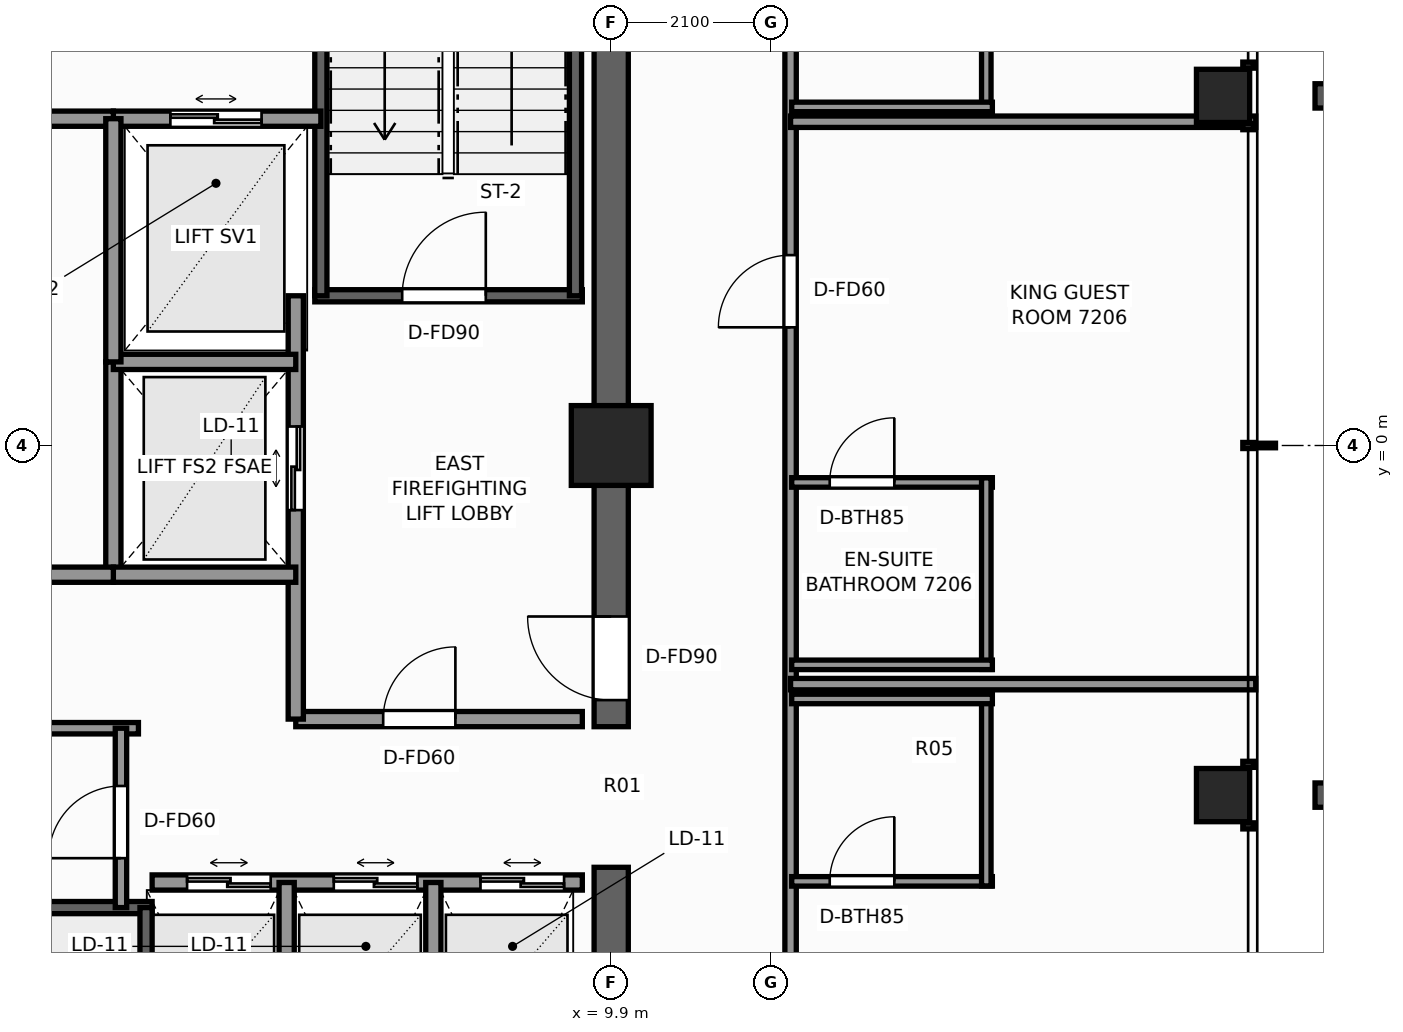
"""IFC4 building model, lengths in metres.
Left out: names, types, materials, properties, quantities, classifications, styles, units other than length and angle.
Written with IfcOpenShell. Run it as: python <this file> out.ifc"""

import sys

from ifc_helpers import new_model, si_unit, direction, frame, frame_2d, origin, origin_2d, place, context, subcontext, project, spatial, rectangle, extrude, element, fill, save


model = new_model("IFC4")
c1 = context("Model", 3, precision=1e-05, world=origin(), true_north=direction((0.0, 1.0)))
c2 = subcontext(c1, "Body", "Model", "MODEL_VIEW")
j1 = project(units=[si_unit("LENGTHUNIT", "METRE"), si_unit("PLANEANGLEUNIT", "RADIAN")], contexts=[c1])
p1 = place(None, origin())
s1 = spatial("IfcSite", under=j1, at=p1, CompositionType="ELEMENT")
p2 = place(p1, origin())
s2 = spatial("IfcBuilding", under=s1, at=p2, CompositionType="ELEMENT")
p3 = place(p2, frame((0.0, 0.0, 247.9)))
s3 = spatial("IfcBuildingStorey", under=s2, at=p3, CompositionType="ELEMENT", Elevation=247.9)
p4 = place(p3, frame((9.9, -9.675, 0.0), z_axis=(0.0, 0.0, 1.0), x_axis=(0.0, 1.0, 0.0)))
e1 = element("IfcWall", 1, at=p4, inside=s3, PredefinedType="SHEAR", context=c2, shape_type="SweptSolid", body=[
    extrude(rectangle(XDim=4.125, YDim=0.45, at=frame_2d((2.062, 0.0))), origin(), (0.0, 0.0, 1.0), 3.5),
])
p5 = place(p3, frame((9.9, -3.7, 0.0), z_axis=(0.0, 0.0, 1.0), x_axis=(0.0, 1.0, 0.0)))
e2 = element("IfcWall", 2, at=p5, inside=s3, PredefinedType="SHEAR", context=c2, shape_type="SweptSolid", body=[
    extrude(rectangle(XDim=13.375, YDim=0.45, at=frame_2d((6.688, 0.0))), origin(), (0.0, 0.0, 1.0), 3.5),
])
p6 = place(p5, frame((0.35, 0.0, 0.0)))
e3 = element("IfcOpeningElement", 3, at=p6, cuts=e2, PredefinedType="OPENING", context=c2, shape_type="SweptSolid", body=[
    extrude(rectangle(XDim=1.1, YDim=2.2, at=frame_2d((0.55, 1.1))), frame((0.0, 0.235, 0.0), z_axis=(0.0, -1.0, 0.0), x_axis=(1.0, 0.0, 0.0)), (0.0, 0.0, 1.0), 0.47),
])
p7 = place(p3, frame((9.9, 0.0, 0.0), z_axis=(0.0, 0.0, 1.0), x_axis=(1.0, 0.0, 0.0)))
e4 = element("IfcColumn", 4, at=p7, inside=s3, PredefinedType="COLUMN", context=c2, shape_type="SweptSolid", body=[
    extrude(rectangle(XDim=1.05, YDim=1.05, at=origin_2d()), origin(), (0.0, 0.0, 1.0), 3.5),
])
for number, where, z_axis, x_axis in (
    (5, (17.95, -4.6, 0.0), (0.0, 0.0, 1.0), (1.0, 0.0, 0.0)),
    (6, (17.95, 4.6, 0.0), (0.0, 0.0, 1.0), (1.0, 0.0, 0.0)),
):
    element("IfcColumn", number, at=place(p3, frame(where, z_axis=z_axis, x_axis=x_axis)), inside=s3, PredefinedType="COLUMN", context=c2, shape_type="SweptSolid", body=[
        extrude(rectangle(XDim=0.7, YDim=0.7, at=origin_2d()), origin(), (0.0, 0.0, 1.0), 3.5),
    ])
p8 = place(p3, frame((6.0, 1.97, 0.0), z_axis=(0.0, 0.0, 1.0), x_axis=(1.0, 0.0, 0.0)))
e7 = element("IfcWall", 7, at=p8, inside=s3, PredefinedType="SHEAR", context=c2, shape_type="SweptSolid", body=[
    extrude(rectangle(XDim=3.52, YDim=0.16, at=frame_2d((1.76, 0.0))), origin(), (0.0, 0.0, 1.0), 3.5),
])
p9 = place(p8, frame((1.15, 0.0, 0.0)))
e8 = element("IfcOpeningElement", 8, at=p9, cuts=e7, PredefinedType="OPENING", context=c2, shape_type="SweptSolid", body=[
    extrude(rectangle(XDim=1.1, YDim=2.2, at=frame_2d((0.55, 1.1))), frame((0.0, 0.09, 0.0), z_axis=(0.0, -1.0, 0.0), x_axis=(1.0, 0.0, 0.0)), (0.0, 0.0, 1.0), 0.18),
])
for number, where, z_axis, x_axis in (
    (9, (6.08, 1.97, 0.0), (0.0, 0.0, 1.0), (0.0, 1.0, 0.0)),
    (10, (9.43, 1.97, 0.0), (0.0, 0.0, 1.0), (0.0, 1.0, 0.0)),
):
    element("IfcWall", number, at=place(p3, frame(where, z_axis=z_axis, x_axis=x_axis)), inside=s3, PredefinedType="SHEAR", context=c2, shape_type="SweptSolid", body=[
        extrude(rectangle(XDim=7.56, YDim=0.16, at=frame_2d((3.78, 0.0))), origin(), (0.0, 0.0, 1.0), 3.5),
    ])
p10 = place(p3, frame((-3.86, -6.08, 0.0), z_axis=(0.0, 0.0, 1.0), x_axis=(1.0, 0.0, 0.0)))
e11 = element("IfcWall", 11, at=p10, inside=s3, PredefinedType="SHEAR", context=c2, shape_type="SweptSolid", body=[
    extrude(rectangle(XDim=7.72, YDim=0.16, at=frame_2d((3.86, 0.0))), origin(), (0.0, 0.0, 1.0), 3.5),
])
p11 = place(p3, frame((3.78, -9.43, 0.0), z_axis=(0.0, 0.0, 1.0), x_axis=(0.0, 1.0, 0.0)))
e12 = element("IfcWall", 12, at=p11, inside=s3, PredefinedType="SHEAR", context=c2, shape_type="SweptSolid", body=[
    extrude(rectangle(XDim=3.35, YDim=0.16, at=frame_2d((1.675, 0.0))), origin(), (0.0, 0.0, 1.0), 3.5),
])
p12 = place(p3, frame((5.75, -3.6, 0.0), z_axis=(0.0, 0.0, 1.0), x_axis=(1.0, 0.0, 0.0)))
e13 = element("IfcWall", 13, at=p12, inside=s3, PredefinedType="SOLIDWALL", context=c2, shape_type="SweptSolid", body=[
    extrude(rectangle(XDim=3.77, YDim=0.2, at=frame_2d((1.885, 0.0))), origin(), (0.0, 0.0, 1.0), 3.25),
])
p13 = place(p12, frame((1.15, 0.0, 0.0)))
e14 = element("IfcOpeningElement", 14, at=p13, cuts=e13, PredefinedType="OPENING", context=c2, shape_type="SweptSolid", body=[
    extrude(rectangle(XDim=0.95, YDim=2.06, at=frame_2d((0.475, 1.03))), frame((0.0, 0.11, 0.0), z_axis=(0.0, -1.0, 0.0), x_axis=(1.0, 0.0, 0.0)), (0.0, 0.0, 1.0), 0.22),
])
p14 = place(p3, frame((5.75, -3.6, 0.0), z_axis=(0.0, 0.0, 1.0), x_axis=(0.0, 1.0, 0.0)))
e15 = element("IfcWall", 15, at=p14, inside=s3, PredefinedType="SOLIDWALL", context=c2, shape_type="SweptSolid", body=[
    extrude(rectangle(XDim=5.57, YDim=0.2, at=frame_2d((2.785, 0.0))), origin(), (0.0, 0.0, 1.0), 3.25),
])
p15 = place(p14, frame((2.75, 0.0, 0.0)))
e16 = element("IfcOpeningElement", 16, at=p15, cuts=e15, PredefinedType="OPENING", context=c2, shape_type="SweptSolid", body=[
    extrude(rectangle(XDim=1.1, YDim=2.2, at=frame_2d((0.55, 1.1))), frame((0.0, 0.11, 0.0), z_axis=(0.0, -1.0, 0.0), x_axis=(1.0, 0.0, 0.0)), (0.0, 0.0, 1.0), 0.22),
])
p16 = place(p3, frame((3.35, -1.7, 0.0), z_axis=(0.0, 0.0, 1.0), x_axis=(0.0, 1.0, 0.0)))
e17 = element("IfcWall", 17, at=p16, inside=s3, PredefinedType="SOLIDWALL", context=c2, shape_type="SweptSolid", body=[
    extrude(rectangle(XDim=2.8, YDim=0.2, at=frame_2d((1.4, 0.0))), origin(), (0.0, 0.0, 1.0), 3.25),
])
for number, where, z_axis, x_axis in (
    (18, (3.35, -1.7, 0.0), (0.0, 0.0, 1.0), (1.0, 0.0, 0.0)),
    (19, (3.35, 1.1, 0.0), (0.0, 0.0, 1.0), (1.0, 0.0, 0.0)),
):
    element("IfcWall", number, at=place(p3, frame(where, z_axis=z_axis, x_axis=x_axis)), inside=s3, PredefinedType="SOLIDWALL", context=c2, shape_type="SweptSolid", body=[
        extrude(rectangle(XDim=2.4, YDim=0.2, at=frame_2d((1.2, 0.0))), origin(), (0.0, 0.0, 1.0), 3.25),
    ])
p17 = place(p3, frame((3.35, 4.3, 0.0), z_axis=(0.0, 0.0, 1.0), x_axis=(1.0, 0.0, 0.0)))
e20 = element("IfcWall", 20, at=p17, inside=s3, PredefinedType="SOLIDWALL", context=c2, shape_type="SweptSolid", body=[
    extrude(rectangle(XDim=2.73, YDim=0.2, at=frame_2d((1.365, 0.0))), origin(), (0.0, 0.0, 1.0), 3.25),
])
p18 = place(p17, frame((0.75, 0.0, 0.0)))
e21 = element("IfcOpeningElement", 21, at=p18, cuts=e20, PredefinedType="OPENING", context=c2, shape_type="SweptSolid", body=[
    extrude(rectangle(XDim=1.2, YDim=2.25, at=frame_2d((0.6, 1.125))), frame((0.0, 0.11, 0.0), z_axis=(0.0, -1.0, 0.0), x_axis=(1.0, 0.0, 0.0)), (0.0, 0.0, 1.0), 0.22),
])
p19 = place(p3, frame((3.86, -5.75, 0.0), z_axis=(0.0, 0.0, 1.0), x_axis=(1.0, 0.0, 0.0)))
e22 = element("IfcWall", 22, at=p19, inside=s3, PredefinedType="SOLIDWALL", context=c2, shape_type="SweptSolid", body=[
    extrude(rectangle(XDim=5.66, YDim=0.2, at=frame_2d((2.83, 0.0))), origin(), (0.0, 0.0, 1.0), 3.25),
])
p20 = place(p19, frame((0.46, 0.0, 0.0)))
e23 = element("IfcOpeningElement", 23, at=p20, cuts=e22, PredefinedType="OPENING", context=c2, shape_type="SweptSolid", body=[
    extrude(rectangle(XDim=1.1, YDim=2.2, at=frame_2d((0.55, 1.1))), frame((0.0, 0.11, 0.0), z_axis=(0.0, -1.0, 0.0), x_axis=(1.0, 0.0, 0.0)), (0.0, 0.0, 1.0), 0.22),
])
p21 = place(p19, frame((2.39, 0.0, 0.0)))
e24 = element("IfcOpeningElement", 24, at=p21, cuts=e22, PredefinedType="OPENING", context=c2, shape_type="SweptSolid", body=[
    extrude(rectangle(XDim=1.1, YDim=2.2, at=frame_2d((0.55, 1.1))), frame((0.0, 0.11, 0.0), z_axis=(0.0, -1.0, 0.0), x_axis=(1.0, 0.0, 0.0)), (0.0, 0.0, 1.0), 0.22),
])
p22 = place(p19, frame((4.32, 0.0, 0.0)))
e25 = element("IfcOpeningElement", 25, at=p22, cuts=e22, PredefinedType="OPENING", context=c2, shape_type="SweptSolid", body=[
    extrude(rectangle(XDim=1.1, YDim=2.2, at=frame_2d((0.55, 1.1))), frame((0.0, 0.11, 0.0), z_axis=(0.0, -1.0, 0.0), x_axis=(1.0, 0.0, 0.0)), (0.0, 0.0, 1.0), 0.22),
])
for number, where, z_axis, x_axis in (
    (26, (5.63, -9.52, 0.0), (0.0, 0.0, 1.0), (0.0, 1.0, 0.0)),
    (27, (7.56, -9.52, 0.0), (0.0, 0.0, 1.0), (0.0, 1.0, 0.0)),
):
    element("IfcWall", number, at=place(p3, frame(where, z_axis=z_axis, x_axis=x_axis)), inside=s3, PredefinedType="SOLIDWALL", context=c2, shape_type="SweptSolid", body=[
        extrude(rectangle(XDim=3.77, YDim=0.2, at=frame_2d((1.885, 0.0))), origin(), (0.0, 0.0, 1.0), 3.25),
    ])
p23 = place(p3, frame((0.22, 4.3, 0.0), z_axis=(0.0, 0.0, 1.0), x_axis=(1.0, 0.0, 0.0)))
e28 = element("IfcWall", 28, at=p23, inside=s3, PredefinedType="SOLIDWALL", context=c2, shape_type="SweptSolid", body=[
    extrude(rectangle(XDim=3.13, YDim=0.2, at=frame_2d((1.565, 0.0))), origin(), (0.0, 0.0, 1.0), 3.25),
])
p24 = place(p23, frame((1.05, 0.0, 0.0)))
e29 = element("IfcOpeningElement", 29, at=p24, cuts=e28, PredefinedType="OPENING", context=c2, shape_type="SweptSolid", body=[
    extrude(rectangle(XDim=0.95, YDim=2.06, at=frame_2d((0.475, 1.03))), frame((0.0, 0.11, 0.0), z_axis=(0.0, -1.0, 0.0), x_axis=(1.0, 0.0, 0.0)), (0.0, 0.0, 1.0), 0.22),
])
p25 = place(p3, frame((-3.35, -1.7, 0.0), z_axis=(0.0, 0.0, 1.0), x_axis=(1.0, 0.0, 0.0)))
e30 = element("IfcWall", 30, at=p25, inside=s3, PredefinedType="SOLIDWALL", context=c2, shape_type="SweptSolid", body=[
    extrude(rectangle(XDim=6.7, YDim=0.2, at=frame_2d((3.35, 0.0))), origin(), (0.0, 0.0, 1.0), 3.25),
])
p26 = place(p3, frame((3.35, 1.1, 0.0), z_axis=(0.0, 0.0, 1.0), x_axis=(0.0, 1.0, 0.0)))
e31 = element("IfcWall", 31, at=p26, inside=s3, PredefinedType="SOLIDWALL", context=c2, shape_type="SweptSolid", body=[
    extrude(rectangle(XDim=3.2, YDim=0.2, at=frame_2d((1.6, 0.0))), origin(), (0.0, 0.0, 1.0), 3.25),
])
p27 = place(p3, frame((-3.68, -3.72, 0.0), z_axis=(0.0, 0.0, 1.0), x_axis=(1.0, 0.0, 0.0)))
e32 = element("IfcWall", 32, at=p27, inside=s3, PredefinedType="PARTITIONING", context=c2, shape_type="SweptSolid", body=[
    extrude(rectangle(XDim=7.36, YDim=0.15, at=frame_2d((3.68, 0.0))), origin(), (0.0, 0.0, 1.0), 3.25),
])
p28 = place(p3, frame((3.45, -6.08, 0.0), z_axis=(0.0, 0.0, 1.0), x_axis=(0.0, 1.0, 0.0)))
e33 = element("IfcWall", 33, at=p28, inside=s3, PredefinedType="PARTITIONING", context=c2, shape_type="SweptSolid", body=[
    extrude(rectangle(XDim=2.36, YDim=0.15, at=frame_2d((1.18, 0.0))), origin(), (0.0, 0.0, 1.0), 3.25),
])
p29 = place(p28, frame((0.65, 0.0, 0.0)))
e34 = element("IfcOpeningElement", 34, at=p29, cuts=e33, PredefinedType="OPENING", context=c2, shape_type="SweptSolid", body=[
    extrude(rectangle(XDim=0.95, YDim=2.06, at=frame_2d((0.475, 1.03))), frame((0.0, 0.085, 0.0), z_axis=(0.0, -1.0, 0.0), x_axis=(1.0, 0.0, 0.0)), (0.0, 0.0, 1.0), 0.17),
])
p30 = place(p3, frame((12.26, -12.58, 0.0), z_axis=(0.0, 0.0, 1.0), x_axis=(0.0, 1.0, 0.0)))
e35 = element("IfcWall", 35, at=p30, inside=s3, PredefinedType="PARTITIONING", context=c2, shape_type="SweptSolid", body=[
    extrude(rectangle(XDim=24.84, YDim=0.15, at=frame_2d((12.42, 0.0))), origin(), (0.0, 0.0, 1.0), 2.539),
])
p31 = place(p30, frame((4.228, 0.0, 0.0)))
e36 = element("IfcOpeningElement", 36, at=p31, cuts=e35, PredefinedType="OPENING", context=c2, shape_type="SweptSolid", body=[
    extrude(rectangle(XDim=0.95, YDim=2.06, at=frame_2d((0.475, 1.03))), frame((0.0, 0.085, 0.0), z_axis=(0.0, -1.0, 0.0), x_axis=(1.0, 0.0, 0.0)), (0.0, 0.0, 1.0), 0.17),
])
p32 = place(p30, frame((14.135, 0.0, 0.0)))
e37 = element("IfcOpeningElement", 37, at=p32, cuts=e35, PredefinedType="OPENING", context=c2, shape_type="SweptSolid", body=[
    extrude(rectangle(XDim=0.95, YDim=2.06, at=frame_2d((0.475, 1.03))), frame((0.0, 0.085, 0.0), z_axis=(0.0, -1.0, 0.0), x_axis=(1.0, 0.0, 0.0)), (0.0, 0.0, 1.0), 0.17),
])
p33 = place(p30, frame((20.542, 0.0, 0.0)))
e38 = element("IfcOpeningElement", 38, at=p33, cuts=e35, PredefinedType="OPENING", context=c2, shape_type="SweptSolid", body=[
    extrude(rectangle(XDim=0.95, YDim=2.06, at=frame_2d((0.475, 1.03))), frame((0.0, 0.085, 0.0), z_axis=(0.0, -1.0, 0.0), x_axis=(1.0, 0.0, 0.0)), (0.0, 0.0, 1.0), 0.17),
])
p34 = place(p3, frame((12.26, -3.14, 0.0), z_axis=(0.0, 0.0, 1.0), x_axis=(1.0, 0.0, 0.0)))
e39 = element("IfcWall", 39, at=p34, inside=s3, PredefinedType="PARTITIONING", context=c2, shape_type="SweptSolid", body=[
    extrude(rectangle(XDim=6.12, YDim=0.15, at=frame_2d((3.06, 0.0))), origin(), (0.0, 0.0, 1.0), 2.539),
])
p35 = place(p3, frame((12.275, -5.735, 0.0), z_axis=(0.0, 0.0, 1.0), x_axis=(1.0, 0.0, 0.0)))
e40 = element("IfcWall", 40, at=p35, inside=s3, PredefinedType="PARTITIONING", context=c2, shape_type="SweptSolid", body=[
    extrude(rectangle(XDim=2.64, YDim=0.125, at=frame_2d((1.32, 0.0))), origin(), (0.0, 0.0, 1.0), 3.25),
])
p36 = place(p35, frame((0.5, 0.0, 0.0)))
e41 = element("IfcOpeningElement", 41, at=p36, cuts=e40, PredefinedType="OPENING", context=c2, shape_type="SweptSolid", body=[
    extrude(rectangle(XDim=0.85, YDim=2.03, at=frame_2d((0.425, 1.015))), frame((0.0, 0.073, 0.0), z_axis=(0.0, -1.0, 0.0), x_axis=(1.0, 0.0, 0.0)), (0.0, 0.0, 1.0), 0.145),
])
p37 = place(p3, frame((14.835, -5.795, 0.0), z_axis=(0.0, 0.0, 1.0), x_axis=(0.0, 1.0, 0.0)))
e42 = element("IfcWall", 42, at=p37, inside=s3, PredefinedType="PARTITIONING", context=c2, shape_type="SweptSolid", body=[
    extrude(rectangle(XDim=2.52, YDim=0.125, at=frame_2d((1.26, 0.0))), origin(), (0.0, 0.0, 1.0), 2.539),
])
p38 = place(p3, frame((12.275, -3.335, 0.0), z_axis=(0.0, 0.0, 1.0), x_axis=(1.0, 0.0, 0.0)))
e43 = element("IfcWall", 43, at=p38, inside=s3, PredefinedType="PARTITIONING", context=c2, shape_type="SweptSolid", body=[
    extrude(rectangle(XDim=2.64, YDim=0.125, at=frame_2d((1.32, 0.0))), origin(), (0.0, 0.0, 1.0), 2.539),
])
p39 = place(p3, frame((12.26, 4.26, 0.0), z_axis=(0.0, 0.0, 1.0), x_axis=(1.0, 0.0, 0.0)))
e44 = element("IfcWall", 44, at=p39, inside=s3, PredefinedType="PARTITIONING", context=c2, shape_type="SweptSolid", body=[
    extrude(rectangle(XDim=6.12, YDim=0.15, at=frame_2d((3.06, 0.0))), origin(), (0.0, 0.0, 1.0), 2.623),
])
p40 = place(p3, frame((12.275, -0.486, 0.0), z_axis=(0.0, 0.0, 1.0), x_axis=(1.0, 0.0, 0.0)))
e45 = element("IfcWall", 45, at=p40, inside=s3, PredefinedType="PARTITIONING", context=c2, shape_type="SweptSolid", body=[
    extrude(rectangle(XDim=2.64, YDim=0.125, at=frame_2d((1.32, 0.0))), origin(), (0.0, 0.0, 1.0), 3.25),
])
p41 = place(p40, frame((0.5, 0.0, 0.0)))
e46 = element("IfcOpeningElement", 46, at=p41, cuts=e45, PredefinedType="OPENING", context=c2, shape_type="SweptSolid", body=[
    extrude(rectangle(XDim=0.85, YDim=2.03, at=frame_2d((0.425, 1.015))), frame((0.0, 0.073, 0.0), z_axis=(0.0, -1.0, 0.0), x_axis=(1.0, 0.0, 0.0)), (0.0, 0.0, 1.0), 0.145),
])
p42 = place(p3, frame((14.835, -2.946, 0.0), z_axis=(0.0, 0.0, 1.0), x_axis=(0.0, 1.0, 0.0)))
e47 = element("IfcWall", 47, at=p42, inside=s3, PredefinedType="PARTITIONING", context=c2, shape_type="SweptSolid", body=[
    extrude(rectangle(XDim=2.52, YDim=0.125, at=frame_2d((1.26, 0.0))), origin(), (0.0, 0.0, 1.0), 2.539),
])
p43 = place(p3, frame((12.275, -2.886, 0.0), z_axis=(0.0, 0.0, 1.0), x_axis=(1.0, 0.0, 0.0)))
e48 = element("IfcWall", 48, at=p43, inside=s3, PredefinedType="PARTITIONING", context=c2, shape_type="SweptSolid", body=[
    extrude(rectangle(XDim=2.64, YDim=0.125, at=frame_2d((1.32, 0.0))), origin(), (0.0, 0.0, 1.0), 2.539),
])
p44 = place(p3, frame((14.835, 4.395, 0.0), z_axis=(0.0, 0.0, 1.0), x_axis=(0.0, 1.0, 0.0)))
e49 = element("IfcWall", 49, at=p44, inside=s3, PredefinedType="PARTITIONING", context=c2, shape_type="SweptSolid", body=[
    extrude(rectangle(XDim=2.52, YDim=0.125, at=frame_2d((1.26, 0.0))), origin(), (0.0, 0.0, 1.0), 2.539),
])
p45 = place(p3, frame((12.275, 4.455, 0.0), z_axis=(0.0, 0.0, 1.0), x_axis=(1.0, 0.0, 0.0)))
e50 = element("IfcWall", 50, at=p45, inside=s3, PredefinedType="PARTITIONING", context=c2, shape_type="SweptSolid", body=[
    extrude(rectangle(XDim=2.64, YDim=0.125, at=frame_2d((1.32, 0.0))), origin(), (0.0, 0.0, 1.0), 2.539),
])
p46 = place(p9, origin())
e51 = element("IfcDoor", 51, at=p46, inside=s3, OperationType="SINGLE_SWING_RIGHT", PredefinedType="DOOR", context=c2, shape_type="SweptSolid", body=[
    extrude(rectangle(XDim=1.1, YDim=2.2, at=frame_2d((0.55, 1.1))), frame((0.0, 0.025, 0.0), z_axis=(0.0, -1.0, 0.0), x_axis=(1.0, 0.0, 0.0)), (0.0, 0.0, 1.0), 0.05),
])
fill(e8, e51)
p47 = place(p6, origin())
e52 = element("IfcDoor", 52, at=p47, inside=s3, OperationType="SINGLE_SWING_RIGHT", PredefinedType="DOOR", context=c2, shape_type="SweptSolid", body=[
    extrude(rectangle(XDim=1.1, YDim=2.2, at=frame_2d((0.55, 1.1))), frame((0.0, 0.025, 0.0), z_axis=(0.0, -1.0, 0.0), x_axis=(1.0, 0.0, 0.0)), (0.0, 0.0, 1.0), 0.05),
])
fill(e3, e52)
p48 = place(p15, origin())
e53 = element("IfcDoor", 53, at=p48, inside=s3, OperationType="DOUBLE_DOOR_SLIDING", PredefinedType="DOOR", context=c2, shape_type="SweptSolid", body=[
    extrude(rectangle(XDim=1.1, YDim=2.2, at=frame_2d((0.55, 1.1))), frame((0.0, 0.025, 0.0), z_axis=(0.0, -1.0, 0.0), x_axis=(1.0, 0.0, 0.0)), (0.0, 0.0, 1.0), 0.05),
])
fill(e16, e53)
p49 = place(p18, origin())
e54 = element("IfcDoor", 54, at=p49, inside=s3, OperationType="DOUBLE_DOOR_SLIDING", PredefinedType="DOOR", context=c2, shape_type="SweptSolid", body=[
    extrude(rectangle(XDim=1.2, YDim=2.25, at=frame_2d((0.6, 1.125))), frame((0.0, 0.025, 0.0), z_axis=(0.0, -1.0, 0.0), x_axis=(1.0, 0.0, 0.0)), (0.0, 0.0, 1.0), 0.05),
])
fill(e21, e54)
p50 = place(p20, origin())
e55 = element("IfcDoor", 55, at=p50, inside=s3, OperationType="DOUBLE_DOOR_SLIDING", PredefinedType="DOOR", context=c2, shape_type="SweptSolid", body=[
    extrude(rectangle(XDim=1.1, YDim=2.2, at=frame_2d((0.55, 1.1))), frame((0.0, 0.025, 0.0), z_axis=(0.0, -1.0, 0.0), x_axis=(1.0, 0.0, 0.0)), (0.0, 0.0, 1.0), 0.05),
])
fill(e23, e55)
p51 = place(p21, origin())
e56 = element("IfcDoor", 56, at=p51, inside=s3, OperationType="DOUBLE_DOOR_SLIDING", PredefinedType="DOOR", context=c2, shape_type="SweptSolid", body=[
    extrude(rectangle(XDim=1.1, YDim=2.2, at=frame_2d((0.55, 1.1))), frame((0.0, 0.025, 0.0), z_axis=(0.0, -1.0, 0.0), x_axis=(1.0, 0.0, 0.0)), (0.0, 0.0, 1.0), 0.05),
])
fill(e24, e56)
p52 = place(p22, origin())
e57 = element("IfcDoor", 57, at=p52, inside=s3, OperationType="DOUBLE_DOOR_SLIDING", PredefinedType="DOOR", context=c2, shape_type="SweptSolid", body=[
    extrude(rectangle(XDim=1.1, YDim=2.2, at=frame_2d((0.55, 1.1))), frame((0.0, 0.025, 0.0), z_axis=(0.0, -1.0, 0.0), x_axis=(1.0, 0.0, 0.0)), (0.0, 0.0, 1.0), 0.05),
])
fill(e25, e57)
p53 = place(p13, origin())
e58 = element("IfcDoor", 58, at=p53, inside=s3, OperationType="SINGLE_SWING_RIGHT", PredefinedType="DOOR", context=c2, shape_type="SweptSolid", body=[
    extrude(rectangle(XDim=0.95, YDim=2.06, at=frame_2d((0.475, 1.03))), frame((0.0, 0.025, 0.0), z_axis=(0.0, -1.0, 0.0), x_axis=(1.0, 0.0, 0.0)), (0.0, 0.0, 1.0), 0.05),
])
fill(e14, e58)
p54 = place(p29, origin())
e59 = element("IfcDoor", 59, at=p54, inside=s3, OperationType="SINGLE_SWING_LEFT", PredefinedType="DOOR", context=c2, shape_type="SweptSolid", body=[
    extrude(rectangle(XDim=0.95, YDim=2.06, at=frame_2d((0.475, 1.03))), frame((0.0, 0.025, 0.0), z_axis=(0.0, -1.0, 0.0), x_axis=(1.0, 0.0, 0.0)), (0.0, 0.0, 1.0), 0.05),
])
fill(e34, e59)
p55 = place(p36, origin())
e60 = element("IfcDoor", 60, at=p55, inside=s3, OperationType="SINGLE_SWING_RIGHT", PredefinedType="DOOR", context=c2, shape_type="SweptSolid", body=[
    extrude(rectangle(XDim=0.85, YDim=2.03, at=frame_2d((0.425, 1.015))), frame((0.0, 0.025, 0.0), z_axis=(0.0, -1.0, 0.0), x_axis=(1.0, 0.0, 0.0)), (0.0, 0.0, 1.0), 0.05),
])
fill(e41, e60)
p56 = place(p41, origin())
e61 = element("IfcDoor", 61, at=p56, inside=s3, OperationType="SINGLE_SWING_RIGHT", PredefinedType="DOOR", context=c2, shape_type="SweptSolid", body=[
    extrude(rectangle(XDim=0.85, YDim=2.03, at=frame_2d((0.425, 1.015))), frame((0.0, 0.025, 0.0), z_axis=(0.0, -1.0, 0.0), x_axis=(1.0, 0.0, 0.0)), (0.0, 0.0, 1.0), 0.05),
])
fill(e46, e61)
p57 = place(p32, origin())
e62 = element("IfcDoor", 62, at=p57, inside=s3, OperationType="SINGLE_SWING_LEFT", PredefinedType="DOOR", context=c2, shape_type="SweptSolid", body=[
    extrude(rectangle(XDim=0.95, YDim=2.06, at=frame_2d((0.475, 1.03))), frame((0.0, 0.025, 0.0), z_axis=(0.0, -1.0, 0.0), x_axis=(1.0, 0.0, 0.0)), (0.0, 0.0, 1.0), 0.05),
])
fill(e37, e62)
save(model, sys.argv[1])
